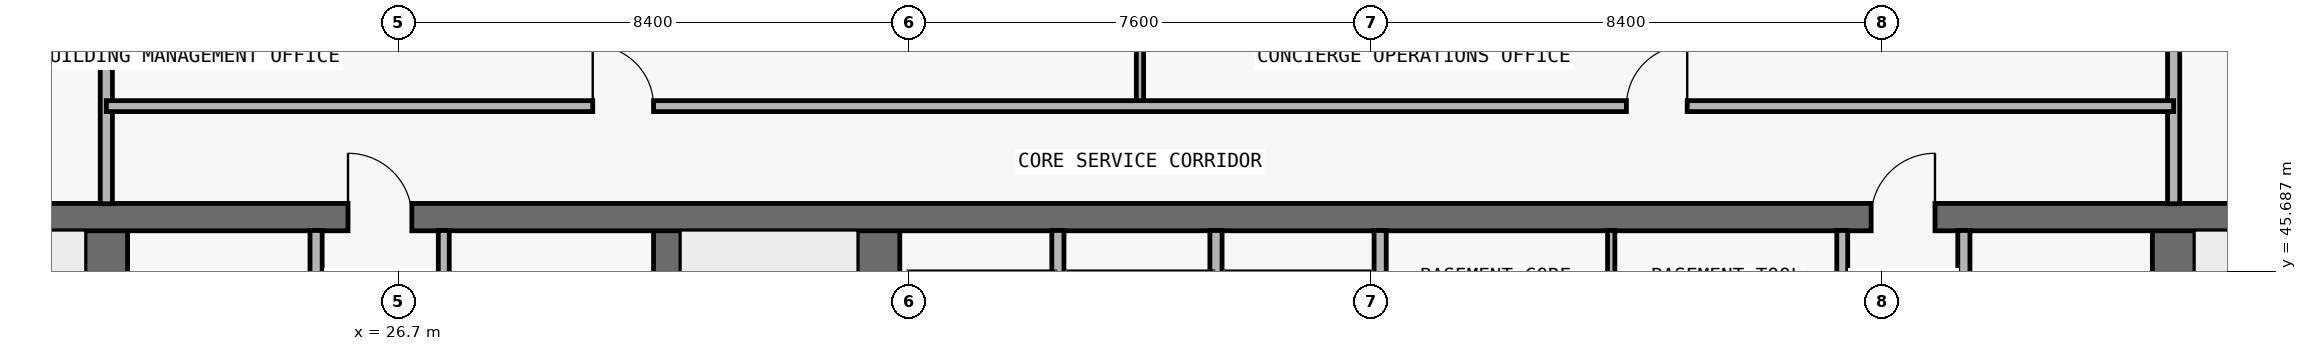
"""IFC4 building model, lengths in metres.
Left out: names, types, materials, properties, quantities, classifications, styles, units other than length and angle.
Written with IfcOpenShell. Run it as: python <this file> out.ifc"""

import sys

from ifc_helpers import new_model, si_unit, direction, frame, frame_2d, origin, place, context, subcontext, project, spatial, rectangle, extrude, element, fill, save


model = new_model("IFC4")
c1 = context("Model", 3, precision=1e-05, world=origin(), true_north=direction((0.0, 1.0)))
c2 = subcontext(c1, "Body", "Model", "MODEL_VIEW")
j1 = project(units=[si_unit("LENGTHUNIT", "METRE"), si_unit("PLANEANGLEUNIT", "RADIAN")], contexts=[c1])
p1 = place(None, origin())
s1 = spatial("IfcSite", under=j1, at=p1, CompositionType="ELEMENT")
p2 = place(p1, origin())
s2 = spatial("IfcBuilding", under=s1, at=p2, CompositionType="ELEMENT")
p3 = place(p2, frame((0.0, 0.0, -9.0)))
s3 = spatial("IfcBuildingStorey", under=s2, at=p3, CompositionType="ELEMENT", Elevation=-9.0)
p4 = place(p3, frame((21.9, 36.9, 0.0), z_axis=(0.0, 0.0, 1.0), x_axis=(0.0, 1.0, 0.0)))
e1 = element("IfcWall", 1, at=p4, inside=s3, PredefinedType="SHEAR", context=c2, shape_type="SweptSolid", body=[
    extrude(rectangle(XDim=9.675, YDim=0.7, at=frame_2d((4.837, 0.0))), origin(), (0.0, 0.0, 1.0), 4.2),
])
p5 = place(p4, frame((0.65, 0.0, 0.0)))
e2 = element("IfcOpeningElement", 2, at=p5, cuts=e1, PredefinedType="OPENING", context=c2, shape_type="SweptSolid", body=[
    extrude(rectangle(XDim=1.1, YDim=2.15, at=frame_2d((0.55, 1.075))), frame((0.0, 0.36, 0.0), z_axis=(0.0, -1.0, 0.0), x_axis=(1.0, 0.0, 0.0)), (0.0, 0.0, 1.0), 0.72),
])
p6 = place(p3, frame((55.9, 36.9, 0.0), z_axis=(0.0, 0.0, 1.0), x_axis=(0.0, 1.0, 0.0)))
e3 = element("IfcWall", 3, at=p6, inside=s3, PredefinedType="SHEAR", context=c2, shape_type="SweptSolid", body=[
    extrude(rectangle(XDim=9.675, YDim=0.7, at=frame_2d((4.837, 0.0))), origin(), (0.0, 0.0, 1.0), 4.2),
])
p7 = place(p6, frame((0.65, 0.0, 0.0)))
e4 = element("IfcOpeningElement", 4, at=p7, cuts=e3, PredefinedType="OPENING", context=c2, shape_type="SweptSolid", body=[
    extrude(rectangle(XDim=1.1, YDim=2.15, at=frame_2d((0.55, 1.075))), frame((0.0, 0.36, 0.0), z_axis=(0.0, -1.0, 0.0), x_axis=(1.0, 0.0, 0.0)), (0.0, 0.0, 1.0), 0.72),
])
p8 = place(p3, frame((31.125, 36.9, 0.0), z_axis=(0.0, 0.0, 1.0), x_axis=(0.0, 1.0, 0.0)))
e5 = element("IfcWall", 5, at=p8, inside=s3, PredefinedType="SHEAR", context=c2, shape_type="SweptSolid", body=[
    extrude(rectangle(XDim=9.675, YDim=0.45, at=frame_2d((4.837, 0.0))), origin(), (0.0, 0.0, 1.0), 4.2),
])
p9 = place(p3, frame((34.6, 36.9, 0.0), z_axis=(0.0, 0.0, 1.0), x_axis=(0.0, 1.0, 0.0)))
e6 = element("IfcWall", 6, at=p9, inside=s3, PredefinedType="SHEAR", context=c2, shape_type="SweptSolid", body=[
    extrude(rectangle(XDim=9.675, YDim=0.7, at=frame_2d((4.837, 0.0))), origin(), (0.0, 0.0, 1.0), 4.2),
])
p10 = place(p3, frame((18.2, 46.575, 0.0), z_axis=(0.0, 0.0, 1.0), x_axis=(1.0, 0.0, 0.0)))
e7 = element("IfcWall", 7, at=p10, inside=s3, PredefinedType="SHEAR", context=c2, shape_type="SweptSolid", body=[
    extrude(rectangle(XDim=41.4, YDim=0.45, at=frame_2d((20.7, 0.0))), origin(), (0.0, 0.0, 1.0), 4.2),
])
p11 = place(p10, frame((7.675, 0.0, 0.0)))
e8 = element("IfcOpeningElement", 8, at=p11, cuts=e7, PredefinedType="OPENING", context=c2, shape_type="SweptSolid", body=[
    extrude(rectangle(XDim=1.05, YDim=2.15, at=frame_2d((0.525, 1.075))), frame((0.0, 0.235, 0.0), z_axis=(0.0, -1.0, 0.0), x_axis=(1.0, 0.0, 0.0)), (0.0, 0.0, 1.0), 0.47),
])
p12 = place(p10, frame((32.725, 0.0, 0.0)))
e9 = element("IfcOpeningElement", 9, at=p12, cuts=e7, PredefinedType="OPENING", context=c2, shape_type="SweptSolid", body=[
    extrude(rectangle(XDim=1.05, YDim=2.15, at=frame_2d((0.525, 1.075))), frame((0.0, 0.235, 0.0), z_axis=(0.0, -1.0, 0.0), x_axis=(1.0, 0.0, 0.0)), (0.0, 0.0, 1.0), 0.47),
])
p13 = place(p3, frame((21.9, 46.795, 0.0), z_axis=(0.0, 0.0, 1.0), x_axis=(0.0, 1.0, 0.0)))
e10 = element("IfcWall", 10, at=p13, inside=s3, PredefinedType="PARTITIONING", context=c2, shape_type="SweptSolid", body=[
    extrude(rectangle(XDim=2.91, YDim=0.2, at=frame_2d((1.455, 0.0))), origin(), (0.0, 0.0, 1.0), 4.2),
])
p14 = place(p3, frame((25.35, 43.17, 0.0), z_axis=(0.0, 0.0, 1.0), x_axis=(0.0, 1.0, 0.0)))
e11 = element("IfcWall", 11, at=p14, inside=s3, PredefinedType="PARTITIONING", context=c2, shape_type="SweptSolid", body=[
    extrude(rectangle(XDim=3.185, YDim=0.2, at=frame_2d((1.593, 0.0))), origin(), (0.0, 0.0, 1.0), 4.2),
])
p15 = place(p3, frame((27.45, 43.17, 0.0), z_axis=(0.0, 0.0, 1.0), x_axis=(0.0, 1.0, 0.0)))
e12 = element("IfcWall", 12, at=p15, inside=s3, PredefinedType="PARTITIONING", context=c2, shape_type="SweptSolid", body=[
    extrude(rectangle(XDim=3.185, YDim=0.18, at=frame_2d((1.593, 0.0))), origin(), (0.0, 0.0, 1.0), 4.2),
])
p16 = place(p3, frame((37.55, 43.17, 0.0), z_axis=(0.0, 0.0, 1.0), x_axis=(0.0, 1.0, 0.0)))
e13 = element("IfcWall", 13, at=p16, inside=s3, PredefinedType="PARTITIONING", context=c2, shape_type="SweptSolid", body=[
    extrude(rectangle(XDim=3.185, YDim=0.2, at=frame_2d((1.593, 0.0))), origin(), (0.0, 0.0, 1.0), 4.2),
])
p17 = place(p3, frame((38.9, 48.4, 0.0), z_axis=(0.0, 0.0, 1.0), x_axis=(0.0, 1.0, 0.0)))
e14 = element("IfcWall", 14, at=p17, inside=s3, PredefinedType="PARTITIONING", context=c2, shape_type="SweptSolid", body=[
    extrude(rectangle(XDim=1.305, YDim=0.12, at=frame_2d((0.653, 0.0))), origin(), (0.0, 0.0, 1.0), 4.2),
])
for number, where, z_axis, x_axis in (
    (15, (40.15, 43.17, 0.0), (0.0, 0.0, 1.0), (0.0, 1.0, 0.0)),
    (16, (42.85, 43.17, 0.0), (0.0, 0.0, 1.0), (0.0, 1.0, 0.0)),
):
    element("IfcWall", number, at=place(p3, frame(where, z_axis=z_axis, x_axis=x_axis)), inside=s3, PredefinedType="PARTITIONING", context=c2, shape_type="SweptSolid", body=[
        extrude(rectangle(XDim=3.185, YDim=0.2, at=frame_2d((1.593, 0.0))), origin(), (0.0, 0.0, 1.0), 4.2),
    ])
p18 = place(p3, frame((46.65, 43.17, 0.0), z_axis=(0.0, 0.0, 1.0), x_axis=(0.0, 1.0, 0.0)))
e17 = element("IfcWall", 17, at=p18, inside=s3, PredefinedType="PARTITIONING", context=c2, shape_type="SweptSolid", body=[
    extrude(rectangle(XDim=3.185, YDim=0.12, at=frame_2d((1.593, 0.0))), origin(), (0.0, 0.0, 1.0), 4.2),
])
p19 = place(p3, frame((50.45, 43.17, 0.0), z_axis=(0.0, 0.0, 1.0), x_axis=(0.0, 1.0, 0.0)))
e18 = element("IfcWall", 18, at=p19, inside=s3, PredefinedType="PARTITIONING", context=c2, shape_type="SweptSolid", body=[
    extrude(rectangle(XDim=3.185, YDim=0.18, at=frame_2d((1.593, 0.0))), origin(), (0.0, 0.0, 1.0), 4.2),
])
p20 = place(p3, frame((52.45, 43.17, 0.0), z_axis=(0.0, 0.0, 1.0), x_axis=(0.0, 1.0, 0.0)))
e19 = element("IfcWall", 19, at=p20, inside=s3, PredefinedType="PARTITIONING", context=c2, shape_type="SweptSolid", body=[
    extrude(rectangle(XDim=3.185, YDim=0.2, at=frame_2d((1.593, 0.0))), origin(), (0.0, 0.0, 1.0), 4.2),
])
p21 = place(p3, frame((55.9, 46.795, 0.0), z_axis=(0.0, 0.0, 1.0), x_axis=(0.0, 1.0, 0.0)))
e20 = element("IfcWall", 20, at=p21, inside=s3, PredefinedType="PARTITIONING", context=c2, shape_type="SweptSolid", body=[
    extrude(rectangle(XDim=2.91, YDim=0.2, at=frame_2d((1.455, 0.0))), origin(), (0.0, 0.0, 1.0), 4.2),
])
p22 = place(p3, frame((21.9, 48.4, 0.0), z_axis=(0.0, 0.0, 1.0), x_axis=(1.0, 0.0, 0.0)))
e21 = element("IfcWall", 21, at=p22, inside=s3, PredefinedType="PARTITIONING", context=c2, shape_type="SweptSolid", body=[
    extrude(rectangle(XDim=34.0, YDim=0.18, at=frame_2d((17.0, 0.0))), origin(), (0.0, 0.0, 1.0), 4.2),
])
p23 = place(p22, frame((8.0, 0.0, 0.0)))
e22 = element("IfcOpeningElement", 22, at=p23, cuts=e21, PredefinedType="OPENING", context=c2, shape_type="SweptSolid", body=[
    extrude(rectangle(XDim=1.0, YDim=2.2, at=frame_2d((0.5, 1.1))), frame((0.0, 0.1, 0.0), z_axis=(0.0, -1.0, 0.0), x_axis=(1.0, 0.0, 0.0)), (0.0, 0.0, 1.0), 0.2),
])
p24 = place(p22, frame((25.0, 0.0, 0.0)))
e23 = element("IfcOpeningElement", 23, at=p24, cuts=e21, PredefinedType="OPENING", context=c2, shape_type="SweptSolid", body=[
    extrude(rectangle(XDim=1.0, YDim=2.2, at=frame_2d((0.5, 1.1))), frame((0.0, 0.1, 0.0), z_axis=(0.0, -1.0, 0.0), x_axis=(1.0, 0.0, 0.0)), (0.0, 0.0, 1.0), 0.2),
])
p25 = place(p11, origin())
e24 = element("IfcDoor", 24, at=p25, inside=s3, OperationType="SINGLE_SWING_LEFT", PredefinedType="DOOR", context=c2, shape_type="SweptSolid", body=[
    extrude(rectangle(XDim=1.05, YDim=2.15, at=frame_2d((0.525, 1.075))), frame((0.0, 0.025, 0.0), z_axis=(0.0, -1.0, 0.0), x_axis=(1.0, 0.0, 0.0)), (0.0, 0.0, 1.0), 0.05),
])
fill(e8, e24)
p26 = place(p12, origin())
e25 = element("IfcDoor", 25, at=p26, inside=s3, OperationType="SINGLE_SWING_RIGHT", PredefinedType="DOOR", context=c2, shape_type="SweptSolid", body=[
    extrude(rectangle(XDim=1.05, YDim=2.15, at=frame_2d((0.525, 1.075))), frame((0.0, 0.025, 0.0), z_axis=(0.0, -1.0, 0.0), x_axis=(1.0, 0.0, 0.0)), (0.0, 0.0, 1.0), 0.05),
])
fill(e9, e25)
p27 = place(p23, origin())
e26 = element("IfcDoor", 26, at=p27, inside=s3, OperationType="SINGLE_SWING_LEFT", PredefinedType="DOOR", context=c2, shape_type="SweptSolid", body=[
    extrude(rectangle(XDim=1.0, YDim=2.2, at=frame_2d((0.5, 1.1))), frame((0.0, 0.025, 0.0), z_axis=(0.0, -1.0, 0.0), x_axis=(1.0, 0.0, 0.0)), (0.0, 0.0, 1.0), 0.05),
])
fill(e22, e26)
p28 = place(p24, origin())
e27 = element("IfcDoor", 27, at=p28, inside=s3, OperationType="SINGLE_SWING_RIGHT", PredefinedType="DOOR", context=c2, shape_type="SweptSolid", body=[
    extrude(rectangle(XDim=1.0, YDim=2.2, at=frame_2d((0.5, 1.1))), frame((0.0, 0.025, 0.0), z_axis=(0.0, -1.0, 0.0), x_axis=(1.0, 0.0, 0.0)), (0.0, 0.0, 1.0), 0.05),
])
fill(e23, e27)
save(model, sys.argv[1])
